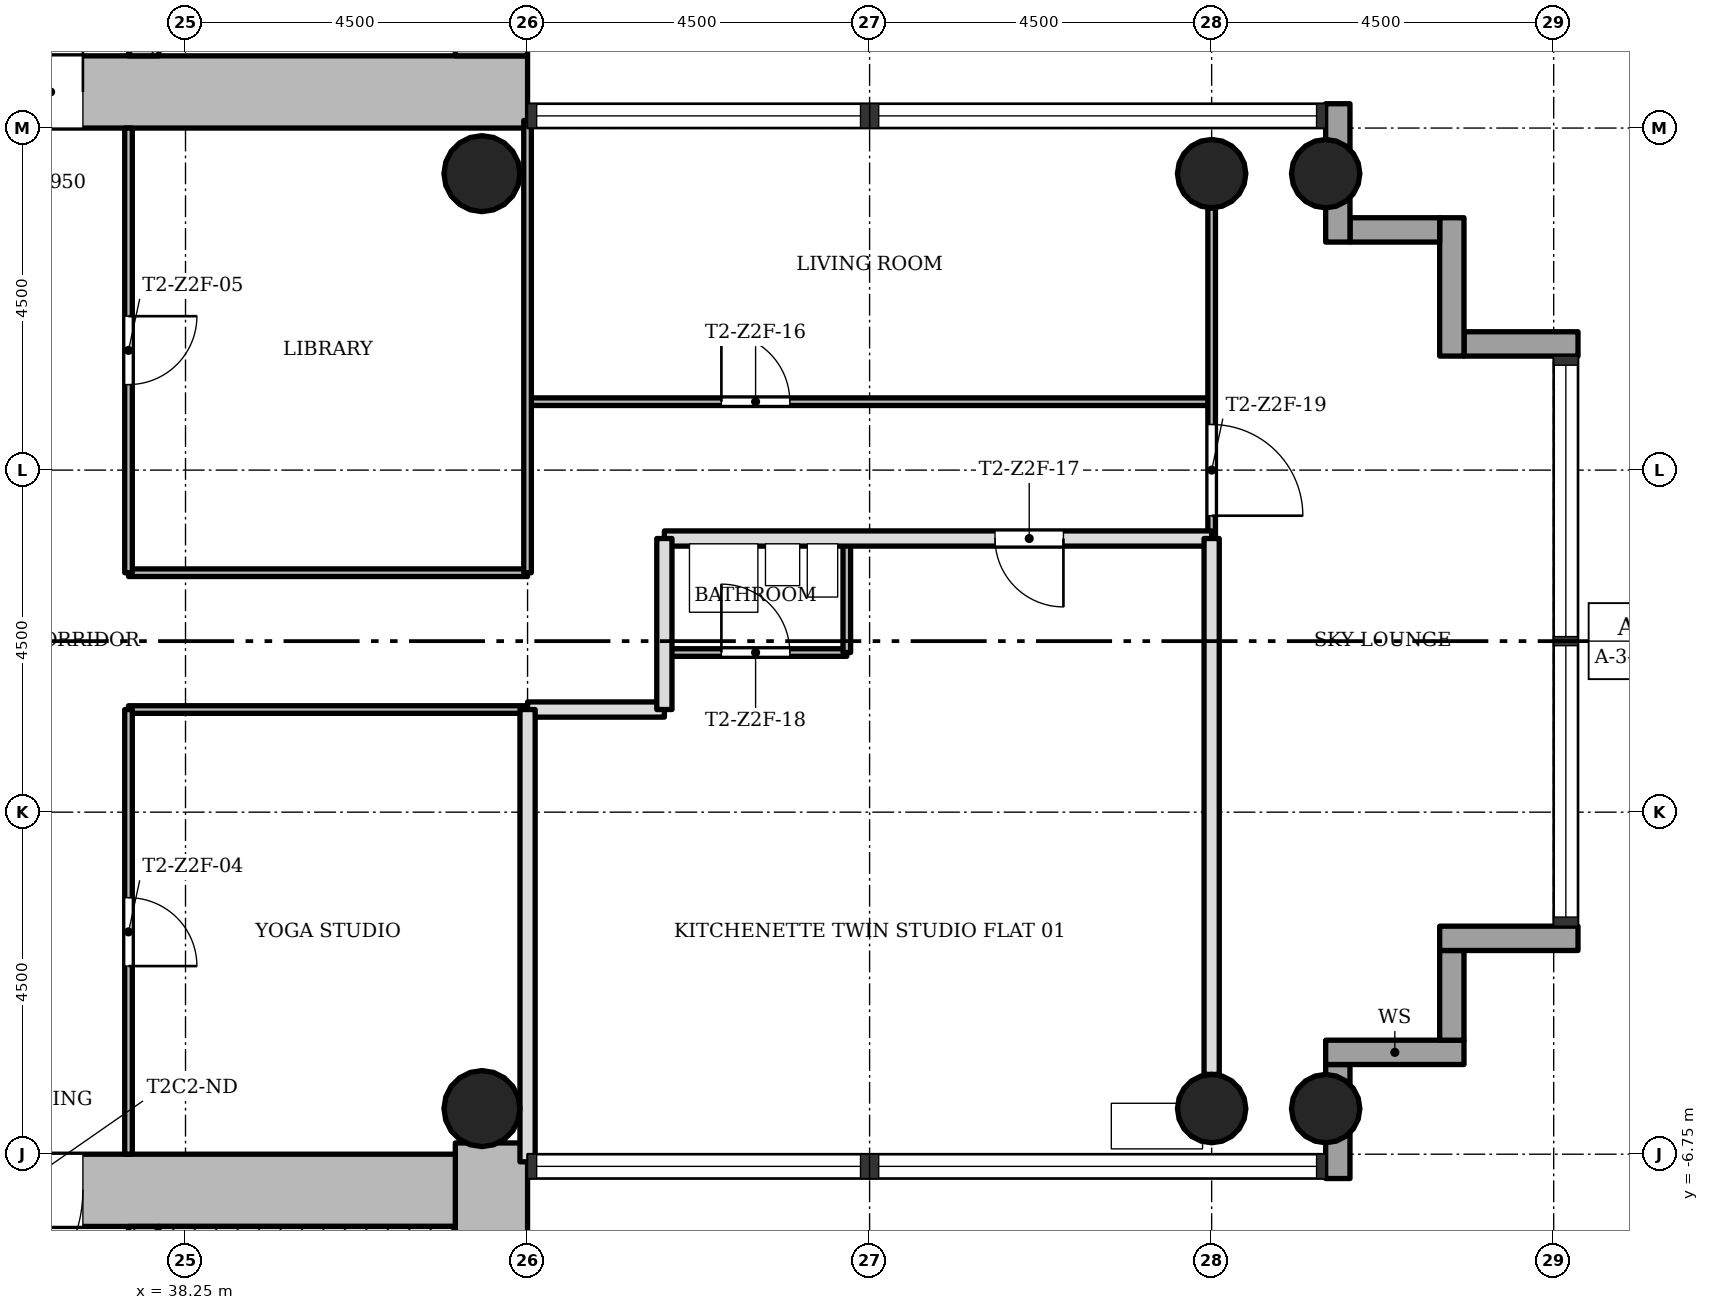
"""IFC4 building model, lengths in metres.
Left out: names, types, materials, properties, quantities, classifications, styles, units other than length and angle.
Written with IfcOpenShell. Run it as: python <this file> out.ifc"""

import sys

from ifc_helpers import new_model, si_unit, direction, frame, frame_2d, origin, origin_2d, place, context, subcontext, project, spatial, rectangle, hollow_circle, extrude, element, fill, save


model = new_model("IFC4")
c1 = context("Model", 3, precision=1e-05, world=origin(), true_north=direction((0.0, 1.0)))
c2 = subcontext(c1, "Body", "Model", "MODEL_VIEW")
j1 = project(units=[si_unit("LENGTHUNIT", "METRE"), si_unit("PLANEANGLEUNIT", "RADIAN")], contexts=[c1])
p1 = place(None, origin())
s1 = spatial("IfcSite", under=j1, at=p1, CompositionType="ELEMENT")
p2 = place(p1, origin())
s2 = spatial("IfcBuilding", under=s1, at=p2, CompositionType="ELEMENT")
p3 = place(p2, frame((0.0, 0.0, 110.6)))
s3 = spatial("IfcBuildingStorey", under=s2, at=p3, CompositionType="ELEMENT", Elevation=110.6)
p4 = place(p3, frame((30.2, 7.225, 0.0), z_axis=(0.0, 0.0, 1.0), x_axis=(1.0, 0.0, 0.0)))
e1 = element("IfcWall", 1, at=p4, inside=s3, PredefinedType="SHEAR", context=c2, shape_type="SweptSolid", body=[
    extrude(rectangle(XDim=12.55, YDim=0.95, at=frame_2d((6.275, 0.0))), origin(), (0.0, 0.0, 1.0), 3.4),
])
p5 = place(p4, frame((4.9, 0.0, 0.0)))
e2 = element("IfcOpeningElement", 2, at=p5, cuts=e1, PredefinedType="OPENING", context=c2, shape_type="SweptSolid", body=[
    extrude(rectangle(XDim=1.8, YDim=2.1, at=frame_2d((0.9, 1.05))), frame((0.0, 0.485, 0.0), z_axis=(0.0, -1.0, 0.0), x_axis=(1.0, 0.0, 0.0)), (0.0, 0.0, 1.0), 0.97),
])
p6 = place(p3, frame((42.275, 7.7, 0.0), z_axis=(0.0, 0.0, 1.0), x_axis=(0.0, 1.0, 0.0)))
e3 = element("IfcWall", 3, at=p6, inside=s3, PredefinedType="SHEAR", context=c2, shape_type="SweptSolid", body=[
    extrude(rectangle(XDim=8.05, YDim=0.95, at=frame_2d((4.025, 0.0))), origin(), (0.0, 0.0, 1.0), 3.4),
])
p7 = place(p3, frame((37.7, 7.7, 0.0), z_axis=(0.0, 0.0, 1.0), x_axis=(0.0, 1.0, 0.0)))
e4 = element("IfcWall", 4, at=p7, inside=s3, PredefinedType="SHEAR", context=c2, shape_type="SweptSolid", body=[
    extrude(rectangle(XDim=7.1, YDim=0.4, at=frame_2d((3.55, 0.0))), origin(), (0.0, 0.0, 1.0), 3.4),
])
p8 = place(p7, frame((0.8, 0.0, 0.0)))
e5 = element("IfcOpeningElement", 5, at=p8, cuts=e4, PredefinedType="OPENING", context=c2, shape_type="SweptSolid", body=[
    extrude(rectangle(XDim=1.1, YDim=2.1, at=frame_2d((0.55, 1.05))), frame((0.0, 0.21, 0.0), z_axis=(0.0, -1.0, 0.0), x_axis=(1.0, 0.0, 0.0)), (0.0, 0.0, 1.0), 0.42),
])
p9 = place(p7, frame((3.0, 0.0, 0.0)))
e6 = element("IfcOpeningElement", 6, at=p9, cuts=e4, PredefinedType="OPENING", context=c2, shape_type="SweptSolid", body=[
    extrude(rectangle(XDim=1.1, YDim=2.1, at=frame_2d((0.55, 1.05))), frame((0.0, 0.21, 0.0), z_axis=(0.0, -1.0, 0.0), x_axis=(1.0, 0.0, 0.0)), (0.0, 0.0, 1.0), 0.42),
])
p10 = place(p7, frame((5.2, 0.0, 0.0)))
e7 = element("IfcOpeningElement", 7, at=p10, cuts=e4, PredefinedType="OPENING", context=c2, shape_type="SweptSolid", body=[
    extrude(rectangle(XDim=1.1, YDim=2.1, at=frame_2d((0.55, 1.05))), frame((0.0, 0.21, 0.0), z_axis=(0.0, -1.0, 0.0), x_axis=(1.0, 0.0, 0.0)), (0.0, 0.0, 1.0), 0.42),
])
p11 = place(p3, frame((42.275, -14.8, 0.0), z_axis=(0.0, 0.0, 1.0), x_axis=(0.0, 1.0, 0.0)))
e8 = element("IfcWall", 8, at=p11, inside=s3, PredefinedType="SHEAR", context=c2, shape_type="SweptSolid", body=[
    extrude(rectangle(XDim=8.198, YDim=0.95, at=frame_2d((4.099, 0.0))), origin(), (0.0, 0.0, 1.0), 3.4),
])
p12 = place(p3, frame((41.8, -7.225, 0.0), z_axis=(0.0, 0.0, 1.0), x_axis=(-1.0, 0.0, 0.0)))
e9 = element("IfcWall", 9, at=p12, inside=s3, PredefinedType="SHEAR", context=c2, shape_type="SweptSolid", body=[
    extrude(rectangle(XDim=12.55, YDim=0.95, at=frame_2d((6.275, 0.0))), origin(), (0.0, 0.0, 1.0), 3.4),
])
p13 = place(p12, frame((4.9, 0.0, 0.0)))
e10 = element("IfcOpeningElement", 10, at=p13, cuts=e9, PredefinedType="OPENING", context=c2, shape_type="SweptSolid", body=[
    extrude(rectangle(XDim=1.8, YDim=2.1, at=frame_2d((0.9, 1.05))), frame((0.0, 0.485, 0.0), z_axis=(0.0, -1.0, 0.0), x_axis=(1.0, 0.0, 0.0)), (0.0, 0.0, 1.0), 0.97),
])
p14 = place(p3, frame((37.7, -14.8, 0.0), z_axis=(0.0, 0.0, 1.0), x_axis=(0.0, 1.0, 0.0)))
e11 = element("IfcWall", 11, at=p14, inside=s3, PredefinedType="SHEAR", context=c2, shape_type="SweptSolid", body=[
    extrude(rectangle(XDim=7.1, YDim=0.4, at=frame_2d((3.55, 0.0))), origin(), (0.0, 0.0, 1.0), 3.4),
])
p15 = place(p14, frame((5.5, 0.0, 0.0)))
e12 = element("IfcOpeningElement", 12, at=p15, cuts=e11, PredefinedType="OPENING", context=c2, shape_type="SweptSolid", body=[
    extrude(rectangle(XDim=0.9, YDim=2.1, at=frame_2d((0.45, 1.05))), frame((0.0, 0.21, 0.0), z_axis=(0.0, -1.0, 0.0), x_axis=(1.0, 0.0, 0.0)), (0.0, 0.0, 1.0), 0.42),
])
for number, where, z_axis, x_axis in (
    (13, (51.75, -6.15, 0.0), (0.0, 0.0, 1.0), (1.0, 0.0, 0.0)),
    (14, (51.75, 6.15, 0.0), (0.0, 0.0, 1.0), (1.0, 0.0, 0.0)),
    (15, (53.25, -6.15, 0.0), (0.0, 0.0, 1.0), (1.0, 0.0, 0.0)),
    (16, (53.25, 6.15, 0.0), (0.0, 0.0, 1.0), (1.0, 0.0, 0.0)),
):
    element("IfcColumn", number, at=place(p3, frame(where, z_axis=z_axis, x_axis=x_axis)), inside=s3, PredefinedType="COLUMN", context=c2, shape_type="SweptSolid", body=[
        extrude(hollow_circle(Radius=0.45, WallThickness=0.032, at=origin_2d()), origin(), (0.0, 0.0, 1.0), 3.4),
    ])
for number, where, z_axis, x_axis in (
    (17, (42.15, -6.15, 0.0), (0.0, 0.0, 1.0), (1.0, 0.0, 0.0)),
    (18, (42.15, 6.15, 0.0), (0.0, 0.0, 1.0), (1.0, 0.0, 0.0)),
):
    element("IfcColumn", number, at=place(p3, frame(where, z_axis=z_axis, x_axis=x_axis)), inside=s3, PredefinedType="COLUMN", context=c2, shape_type="SweptSolid", body=[
        extrude(hollow_circle(Radius=0.5, WallThickness=0.036, at=origin_2d()), origin(), (0.0, 0.0, 1.0), 3.4),
    ])
p16 = place(p3, frame((53.41, -7.07, -0.3), z_axis=(0.0, 0.0, 1.0), x_axis=(0.0, 1.0, 0.0)))
e19 = element("IfcWall", 19, at=p16, inside=s3, PredefinedType="STANDARD", context=c2, shape_type="SweptSolid", body=[
    extrude(rectangle(XDim=1.5, YDim=0.32, at=frame_2d((0.75, 0.0))), origin(), (0.0, 0.0, 1.0), 3.4),
])
p17 = place(p3, frame((53.25, -5.41, -0.3), z_axis=(0.0, 0.0, 1.0), x_axis=(1.0, 0.0, 0.0)))
e20 = element("IfcWall", 20, at=p17, inside=s3, PredefinedType="STANDARD", context=c2, shape_type="SweptSolid", body=[
    extrude(rectangle(XDim=1.82, YDim=0.32, at=frame_2d((0.91, 0.0))), origin(), (0.0, 0.0, 1.0), 3.4),
])
p18 = place(p3, frame((54.91, -5.25, -0.3), z_axis=(0.0, 0.0, 1.0), x_axis=(0.0, 1.0, 0.0)))
e21 = element("IfcWall", 21, at=p18, inside=s3, PredefinedType="STANDARD", context=c2, shape_type="SweptSolid", body=[
    extrude(rectangle(XDim=1.18, YDim=0.32, at=frame_2d((0.59, 0.0))), origin(), (0.0, 0.0, 1.0), 3.4),
])
p19 = place(p3, frame((54.75, -3.91, -0.3), z_axis=(0.0, 0.0, 1.0), x_axis=(1.0, 0.0, 0.0)))
e22 = element("IfcWall", 22, at=p19, inside=s3, PredefinedType="STANDARD", context=c2, shape_type="SweptSolid", body=[
    extrude(rectangle(XDim=1.82, YDim=0.32, at=frame_2d((0.91, 0.0))), origin(), (0.0, 0.0, 1.0), 3.4),
])
p20 = place(p3, frame((56.57, 3.91, -0.3), z_axis=(0.0, 0.0, 1.0), x_axis=(-1.0, 0.0, 0.0)))
e23 = element("IfcWall", 23, at=p20, inside=s3, PredefinedType="STANDARD", context=c2, shape_type="SweptSolid", body=[
    extrude(rectangle(XDim=1.5, YDim=0.32, at=frame_2d((0.75, 0.0))), origin(), (0.0, 0.0, 1.0), 3.4),
])
p21 = place(p3, frame((54.91, 3.75, -0.3), z_axis=(0.0, 0.0, 1.0), x_axis=(0.0, 1.0, 0.0)))
e24 = element("IfcWall", 24, at=p21, inside=s3, PredefinedType="STANDARD", context=c2, shape_type="SweptSolid", body=[
    extrude(rectangle(XDim=1.82, YDim=0.32, at=frame_2d((0.91, 0.0))), origin(), (0.0, 0.0, 1.0), 3.4),
])
p22 = place(p3, frame((54.75, 5.41, -0.3), z_axis=(0.0, 0.0, 1.0), x_axis=(-1.0, 0.0, 0.0)))
e25 = element("IfcWall", 25, at=p22, inside=s3, PredefinedType="STANDARD", context=c2, shape_type="SweptSolid", body=[
    extrude(rectangle(XDim=1.18, YDim=0.32, at=frame_2d((0.59, 0.0))), origin(), (0.0, 0.0, 1.0), 3.4),
])
p23 = place(p3, frame((53.41, 5.25, -0.3), z_axis=(0.0, 0.0, 1.0), x_axis=(0.0, 1.0, 0.0)))
e26 = element("IfcWall", 26, at=p23, inside=s3, PredefinedType="STANDARD", context=c2, shape_type="SweptSolid", body=[
    extrude(rectangle(XDim=1.82, YDim=0.32, at=frame_2d((0.91, 0.0))), origin(), (0.0, 0.0, 1.0), 3.4),
])
p24 = place(p3, frame((42.75, -0.9, 0.0), z_axis=(0.0, 0.0, 1.0), x_axis=(-1.0, 0.0, 0.0)))
e27 = element("IfcWall", 27, at=p24, inside=s3, PredefinedType="PARTITIONING", context=c2, shape_type="SweptSolid", body=[
    extrude(rectangle(XDim=5.25, YDim=0.1, at=frame_2d((2.625, 0.0))), origin(), (0.0, 0.0, 1.0), 3.0),
])
p25 = place(p3, frame((44.55, -0.9, 0.0), z_axis=(0.0, 0.0, 1.0), x_axis=(-1.0, 0.0, 0.0)))
e28 = element("IfcWall", 28, at=p25, inside=s3, PredefinedType="SOLIDWALL", context=c2, shape_type="SweptSolid", body=[
    extrude(rectangle(XDim=1.8, YDim=0.2, at=frame_2d((0.9, 0.0))), origin(), (0.0, 0.0, 1.0), 3.0),
])
p26 = place(p3, frame((46.95, -0.15, 0.0), z_axis=(0.0, 0.0, 1.0), x_axis=(-1.0, 0.0, 0.0)))
e29 = element("IfcWall", 29, at=p26, inside=s3, PredefinedType="PARTITIONING", context=c2, shape_type="SweptSolid", body=[
    extrude(rectangle(XDim=2.4, YDim=0.1, at=frame_2d((1.2, 0.0))), origin(), (0.0, 0.0, 1.0), 3.0),
])
p27 = place(p26, frame((0.75, 0.0, 0.0)))
e30 = element("IfcOpeningElement", 30, at=p27, cuts=e29, PredefinedType="OPENING", context=c2, shape_type="SweptSolid", body=[
    extrude(rectangle(XDim=0.9, YDim=2.1, at=frame_2d((0.45, 1.05))), frame((0.0, 0.06, 0.0), z_axis=(0.0, -1.0, 0.0), x_axis=(1.0, 0.0, 0.0)), (0.0, 0.0, 1.0), 0.12),
])
p28 = place(p3, frame((42.75, 0.9, 0.0), z_axis=(0.0, 0.0, 1.0), x_axis=(-1.0, 0.0, 0.0)))
e31 = element("IfcWall", 31, at=p28, inside=s3, PredefinedType="PARTITIONING", context=c2, shape_type="SweptSolid", body=[
    extrude(rectangle(XDim=5.25, YDim=0.1, at=frame_2d((2.625, 0.0))), origin(), (0.0, 0.0, 1.0), 3.0),
])
p29 = place(p3, frame((51.75, 1.35, 0.0), z_axis=(0.0, 0.0, 1.0), x_axis=(-1.0, 0.0, 0.0)))
e32 = element("IfcWall", 32, at=p29, inside=s3, PredefinedType="SOLIDWALL", context=c2, shape_type="SweptSolid", body=[
    extrude(rectangle(XDim=7.2, YDim=0.2, at=frame_2d((3.6, 0.0))), origin(), (0.0, 0.0, 1.0), 3.0),
])
p30 = place(p29, frame((1.95, 0.0, 0.0)))
e33 = element("IfcOpeningElement", 33, at=p30, cuts=e32, PredefinedType="OPENING", context=c2, shape_type="SweptSolid", body=[
    extrude(rectangle(XDim=0.9, YDim=2.1, at=frame_2d((0.45, 1.05))), frame((0.0, 0.11, 0.0), z_axis=(0.0, -1.0, 0.0), x_axis=(1.0, 0.0, 0.0)), (0.0, 0.0, 1.0), 0.22),
])
p31 = place(p3, frame((51.75, 3.15, 0.0), z_axis=(0.0, 0.0, 1.0), x_axis=(-1.0, 0.0, 0.0)))
e34 = element("IfcWall", 34, at=p31, inside=s3, PredefinedType="PARTITIONING", context=c2, shape_type="SweptSolid", body=[
    extrude(rectangle(XDim=9.0, YDim=0.1, at=frame_2d((4.5, 0.0))), origin(), (0.0, 0.0, 1.0), 3.0),
])
p32 = place(p31, frame((5.55, 0.0, 0.0)))
e35 = element("IfcOpeningElement", 35, at=p32, cuts=e34, PredefinedType="OPENING", context=c2, shape_type="SweptSolid", body=[
    extrude(rectangle(XDim=0.9, YDim=2.1, at=frame_2d((0.45, 1.05))), frame((0.0, 0.06, 0.0), z_axis=(0.0, -1.0, 0.0), x_axis=(1.0, 0.0, 0.0)), (0.0, 0.0, 1.0), 0.12),
])
p33 = place(p3, frame((51.75, 1.35, 0.0), z_axis=(0.0, 0.0, 1.0), x_axis=(0.0, 1.0, 0.0)))
e36 = element("IfcWall", 36, at=p33, inside=s3, PredefinedType="PARTITIONING", context=c2, shape_type="SweptSolid", body=[
    extrude(rectangle(XDim=4.35, YDim=0.1, at=frame_2d((2.175, 0.0))), origin(), (0.0, 0.0, 1.0), 3.0),
])
p34 = place(p33, frame((0.3, 0.0, 0.0)))
e37 = element("IfcOpeningElement", 37, at=p34, cuts=e36, PredefinedType="OPENING", context=c2, shape_type="SweptSolid", body=[
    extrude(rectangle(XDim=1.2, YDim=2.1, at=frame_2d((0.6, 1.05))), frame((0.0, 0.06, 0.0), z_axis=(0.0, -1.0, 0.0), x_axis=(1.0, 0.0, 0.0)), (0.0, 0.0, 1.0), 0.12),
])
p35 = place(p3, frame((51.75, -5.7, 0.0), z_axis=(0.0, 0.0, 1.0), x_axis=(0.0, 1.0, 0.0)))
e38 = element("IfcWall", 38, at=p35, inside=s3, PredefinedType="SOLIDWALL", context=c2, shape_type="SweptSolid", body=[
    extrude(rectangle(XDim=7.05, YDim=0.2, at=frame_2d((3.525, 0.0))), origin(), (0.0, 0.0, 1.0), 3.0),
])
p36 = place(p3, frame((46.95, -0.15, 0.0), z_axis=(0.0, 0.0, 1.0), x_axis=(0.0, 1.0, 0.0)))
e39 = element("IfcWall", 39, at=p36, inside=s3, PredefinedType="PARTITIONING", context=c2, shape_type="SweptSolid", body=[
    extrude(rectangle(XDim=1.5, YDim=0.1, at=frame_2d((0.75, 0.0))), origin(), (0.0, 0.0, 1.0), 3.0),
])
p37 = place(p3, frame((44.55, -0.9, 0.0), z_axis=(0.0, 0.0, 1.0), x_axis=(0.0, 1.0, 0.0)))
e40 = element("IfcWall", 40, at=p37, inside=s3, PredefinedType="SOLIDWALL", context=c2, shape_type="SweptSolid", body=[
    extrude(rectangle(XDim=2.25, YDim=0.2, at=frame_2d((1.125, 0.0))), origin(), (0.0, 0.0, 1.0), 3.0),
])
p38 = place(p3, frame((42.75, 0.9, 0.0), z_axis=(0.0, 0.0, 1.0), x_axis=(0.0, 1.0, 0.0)))
e41 = element("IfcWall", 41, at=p38, inside=s3, PredefinedType="PARTITIONING", context=c2, shape_type="SweptSolid", body=[
    extrude(rectangle(XDim=5.95, YDim=0.1, at=frame_2d((2.975, 0.0))), origin(), (0.0, 0.0, 1.0), 3.0),
])
p39 = place(p3, frame((42.75, -6.85, 0.0), z_axis=(0.0, 0.0, 1.0), x_axis=(0.0, 1.0, 0.0)))
e42 = element("IfcWall", 42, at=p39, inside=s3, PredefinedType="SOLIDWALL", context=c2, shape_type="SweptSolid", body=[
    extrude(rectangle(XDim=5.95, YDim=0.2, at=frame_2d((2.975, 0.0))), origin(), (0.0, 0.0, 1.0), 3.0),
])
p40 = place(p3, frame((37.5, -6.75, 0.0), z_axis=(0.0, 0.0, 1.0), x_axis=(0.0, 1.0, 0.0)))
e43 = element("IfcWall", 43, at=p40, inside=s3, PredefinedType="PARTITIONING", context=c2, shape_type="SweptSolid", body=[
    extrude(rectangle(XDim=5.85, YDim=0.1, at=frame_2d((2.925, 0.0))), origin(), (0.0, 0.0, 1.0), 3.0),
])
p41 = place(p40, frame((2.475, 0.0, 0.0)))
e44 = element("IfcOpeningElement", 44, at=p41, cuts=e43, PredefinedType="OPENING", context=c2, shape_type="SweptSolid", body=[
    extrude(rectangle(XDim=0.9, YDim=2.1, at=frame_2d((0.45, 1.05))), frame((0.0, 0.06, 0.0), z_axis=(0.0, -1.0, 0.0), x_axis=(1.0, 0.0, 0.0)), (0.0, 0.0, 1.0), 0.12),
])
p42 = place(p3, frame((37.5, 0.9, 0.0), z_axis=(0.0, 0.0, 1.0), x_axis=(0.0, 1.0, 0.0)))
e45 = element("IfcWall", 45, at=p42, inside=s3, PredefinedType="PARTITIONING", context=c2, shape_type="SweptSolid", body=[
    extrude(rectangle(XDim=5.85, YDim=0.1, at=frame_2d((2.925, 0.0))), origin(), (0.0, 0.0, 1.0), 3.0),
])
p43 = place(p42, frame((2.475, 0.0, 0.0)))
e46 = element("IfcOpeningElement", 46, at=p43, cuts=e45, PredefinedType="OPENING", context=c2, shape_type="SweptSolid", body=[
    extrude(rectangle(XDim=0.9, YDim=2.1, at=frame_2d((0.45, 1.05))), frame((0.0, 0.06, 0.0), z_axis=(0.0, -1.0, 0.0), x_axis=(1.0, 0.0, 0.0)), (0.0, 0.0, 1.0), 0.12),
])
p44 = place(p3, frame((37.9, -7.825, 0.0), z_axis=(0.0, 0.0, 1.0), x_axis=(1.0, 0.0, 0.0)))
e47 = element("IfcWall", 47, at=p44, inside=s3, PredefinedType="SHEAR", context=c2, shape_type="SweptSolid", body=[
    extrude(rectangle(XDim=3.9, YDim=0.25, at=frame_2d((1.95, 0.0))), origin(), (0.0, 0.0, 1.0), 3.4),
])
p45 = place(p41, origin())
e48 = element("IfcDoor", 48, at=p45, inside=s3, OperationType="SINGLE_SWING_LEFT", PredefinedType="DOOR", context=c2, shape_type="SweptSolid", body=[
    extrude(rectangle(XDim=0.9, YDim=2.1, at=frame_2d((0.45, 1.05))), frame((0.0, 0.025, 0.0), z_axis=(0.0, -1.0, 0.0), x_axis=(1.0, 0.0, 0.0)), (0.0, 0.0, 1.0), 0.05),
])
fill(e44, e48)
p46 = place(p43, origin())
e49 = element("IfcDoor", 49, at=p46, inside=s3, OperationType="SINGLE_SWING_RIGHT", PredefinedType="DOOR", context=c2, shape_type="SweptSolid", body=[
    extrude(rectangle(XDim=0.9, YDim=2.1, at=frame_2d((0.45, 1.05))), frame((0.0, 0.025, 0.0), z_axis=(0.0, -1.0, 0.0), x_axis=(1.0, 0.0, 0.0)), (0.0, 0.0, 1.0), 0.05),
])
fill(e46, e49)
p47 = place(p32, origin())
e50 = element("IfcDoor", 50, at=p47, inside=s3, OperationType="SINGLE_SWING_RIGHT", PredefinedType="DOOR", context=c2, shape_type="SweptSolid", body=[
    extrude(rectangle(XDim=0.9, YDim=2.1, at=frame_2d((0.45, 1.05))), frame((0.0, 0.025, 0.0), z_axis=(0.0, -1.0, 0.0), x_axis=(1.0, 0.0, 0.0)), (0.0, 0.0, 1.0), 0.05),
])
fill(e35, e50)
p48 = place(p30, origin())
e51 = element("IfcDoor", 51, at=p48, inside=s3, OperationType="SINGLE_SWING_RIGHT", PredefinedType="DOOR", context=c2, shape_type="SweptSolid", body=[
    extrude(rectangle(XDim=0.9, YDim=2.1, at=frame_2d((0.45, 1.05))), frame((0.0, 0.025, 0.0), z_axis=(0.0, -1.0, 0.0), x_axis=(1.0, 0.0, 0.0)), (0.0, 0.0, 1.0), 0.05),
])
fill(e33, e51)
p49 = place(p27, origin())
e52 = element("IfcDoor", 52, at=p49, inside=s3, OperationType="SINGLE_SWING_RIGHT", PredefinedType="DOOR", context=c2, shape_type="SweptSolid", body=[
    extrude(rectangle(XDim=0.9, YDim=2.1, at=frame_2d((0.45, 1.05))), frame((0.0, 0.025, 0.0), z_axis=(0.0, -1.0, 0.0), x_axis=(1.0, 0.0, 0.0)), (0.0, 0.0, 1.0), 0.05),
])
fill(e30, e52)
p50 = place(p34, origin())
e53 = element("IfcDoor", 53, at=p50, inside=s3, OperationType="SINGLE_SWING_LEFT", PredefinedType="DOOR", context=c2, shape_type="SweptSolid", body=[
    extrude(rectangle(XDim=1.2, YDim=2.1, at=frame_2d((0.6, 1.05))), frame((0.0, 0.025, 0.0), z_axis=(0.0, -1.0, 0.0), x_axis=(1.0, 0.0, 0.0)), (0.0, 0.0, 1.0), 0.05),
])
fill(e37, e53)
p51 = place(p5, origin())
e54 = element("IfcDoor", 54, at=p51, inside=s3, OperationType="SINGLE_SWING_LEFT", PredefinedType="DOOR", context=c2, shape_type="SweptSolid", body=[
    extrude(rectangle(XDim=1.8, YDim=2.1, at=frame_2d((0.9, 1.05))), frame((0.0, 0.025, 0.0), z_axis=(0.0, -1.0, 0.0), x_axis=(1.0, 0.0, 0.0)), (0.0, 0.0, 1.0), 0.05),
])
fill(e2, e54)
p52 = place(p13, origin())
e55 = element("IfcDoor", 55, at=p52, inside=s3, OperationType="SINGLE_SWING_LEFT", PredefinedType="DOOR", context=c2, shape_type="SweptSolid", body=[
    extrude(rectangle(XDim=1.8, YDim=2.1, at=frame_2d((0.9, 1.05))), frame((0.0, 0.025, 0.0), z_axis=(0.0, -1.0, 0.0), x_axis=(1.0, 0.0, 0.0)), (0.0, 0.0, 1.0), 0.05),
])
fill(e10, e55)
save(model, sys.argv[1])
